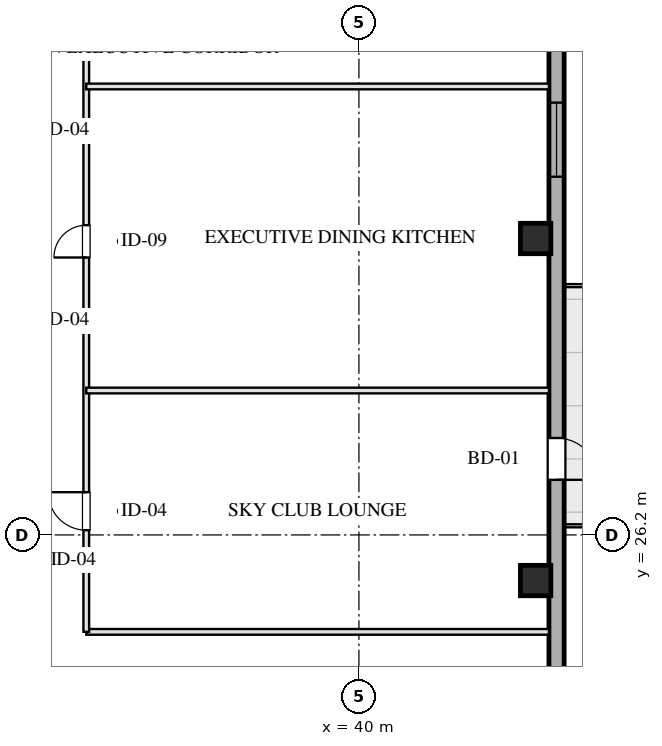
"""IFC4 building model, lengths in metres.
Left out: names, types, materials, properties, quantities, classifications, styles, units other than length and angle.
Written with IfcOpenShell. Run it as: python <this file> out.ifc"""

import sys

from ifc_helpers import new_model, si_unit, direction, frame, frame_2d, origin, origin_2d, place, context, subcontext, project, spatial, rectangle, hollow_rectangle, extrude, element, fill, save


model = new_model("IFC4")
c1 = context("Model", 3, precision=1e-05, world=origin(), true_north=direction((0.0, 1.0)))
c2 = subcontext(c1, "Body", "Model", "MODEL_VIEW")
j1 = project(units=[si_unit("LENGTHUNIT", "METRE"), si_unit("PLANEANGLEUNIT", "RADIAN")], contexts=[c1])
p1 = place(None, origin())
s1 = spatial("IfcSite", under=j1, at=p1, CompositionType="ELEMENT")
p2 = place(p1, origin())
s2 = spatial("IfcBuilding", under=s1, at=p2, CompositionType="ELEMENT")
p3 = place(p2, frame((0.0, 0.0, 250.4)))
s3 = spatial("IfcBuildingStorey", under=s2, at=p3, CompositionType="ELEMENT", Elevation=250.4)
for number, where, z_axis, x_axis in (
    (1, (44.65, 25.0, 0.0), (0.0, 0.0, 1.0), (1.0, 0.0, 0.0)),
    (2, (44.65, 34.0, 0.0), (0.0, 0.0, 1.0), (1.0, 0.0, 0.0)),
):
    element("IfcColumn", number, at=place(p3, frame(where, z_axis=z_axis, x_axis=x_axis)), inside=s3, PredefinedType="COLUMN", context=c2, shape_type="SweptSolid", body=[
        extrude(hollow_rectangle(XDim=0.8, YDim=0.8, WallThickness=0.028, at=origin_2d()), origin(), (0.0, 0.0, 1.0), 3.201),
    ])
p4 = place(p3, frame((45.2, 54.9, 0.0), z_axis=(0.0, 0.0, 1.0), x_axis=(0.0, -1.0, 0.0)))
e3 = element("IfcWall", 3, at=p4, inside=s3, PredefinedType="SOLIDWALL", context=c2, shape_type="SweptSolid", body=[
    extrude(rectangle(XDim=41.8, YDim=0.4, at=frame_2d((20.9, 0.0))), origin(), (0.0, 0.0, 1.0), 2.36),
])
p5 = place(p4, frame((17.325, 0.0, 0.75)))
e4 = element("IfcOpeningElement", 4, at=p5, cuts=e3, PredefinedType="OPENING", context=c2, shape_type="SweptSolid", body=[
    extrude(rectangle(XDim=1.95, YDim=1.21, at=frame_2d((0.975, 0.605))), frame((0.0, 0.21, 0.0), z_axis=(0.0, -1.0, 0.0), x_axis=(1.0, 0.0, 0.0)), (0.0, 0.0, 1.0), 0.42),
])
p6 = place(p4, frame((13.525, 0.0, 0.75)))
e5 = element("IfcOpeningElement", 5, at=p6, cuts=e3, PredefinedType="OPENING", context=c2, shape_type="SweptSolid", body=[
    extrude(rectangle(XDim=1.95, YDim=1.21, at=frame_2d((0.975, 0.605))), frame((0.0, 0.21, 0.0), z_axis=(0.0, -1.0, 0.0), x_axis=(1.0, 0.0, 0.0)), (0.0, 0.0, 1.0), 0.42),
])
p7 = place(p4, frame((26.15, 0.0, 0.0)))
e6 = element("IfcOpeningElement", 6, at=p7, cuts=e3, PredefinedType="OPENING", context=c2, shape_type="SweptSolid", body=[
    extrude(rectangle(XDim=1.1, YDim=2.15, at=frame_2d((0.55, 1.075))), frame((0.0, 0.21, 0.0), z_axis=(0.0, -1.0, 0.0), x_axis=(1.0, 0.0, 0.0)), (0.0, 0.0, 1.0), 0.42),
])
p8 = place(p3, frame((32.825, 23.65, 0.0), z_axis=(0.0, 0.0, 1.0), x_axis=(1.0, 0.0, 0.0)))
e7 = element("IfcWall", 7, at=p8, inside=s3, PredefinedType="PARTITIONING", context=c2, shape_type="SweptSolid", body=[
    extrude(rectangle(XDim=12.175, YDim=0.15, at=frame_2d((6.087, 0.0))), origin(), (0.0, 0.0, 1.0), 2.925),
])
p9 = place(p3, frame((32.825, 23.65, 0.0), z_axis=(0.0, 0.0, 1.0), x_axis=(0.0, 1.0, 0.0)))
e8 = element("IfcWall", 8, at=p9, inside=s3, PredefinedType="PARTITIONING", context=c2, shape_type="SweptSolid", body=[
    extrude(rectangle(XDim=20.7, YDim=0.15, at=frame_2d((10.35, 0.0))), origin(), (0.0, 0.0, 1.0), 2.925),
])
p10 = place(p9, frame((2.675, 0.0, 0.0)))
e9 = element("IfcOpeningElement", 9, at=p10, cuts=e8, PredefinedType="OPENING", context=c2, shape_type="SweptSolid", body=[
    extrude(rectangle(XDim=1.0, YDim=2.05, at=frame_2d((0.5, 1.025))), frame((0.0, 0.085, 0.0), z_axis=(0.0, -1.0, 0.0), x_axis=(1.0, 0.0, 0.0)), (0.0, 0.0, 1.0), 0.17),
])
p11 = place(p9, frame((9.85, 0.0, 0.0)))
e10 = element("IfcOpeningElement", 10, at=p11, cuts=e8, PredefinedType="OPENING", context=c2, shape_type="SweptSolid", body=[
    extrude(rectangle(XDim=0.85, YDim=2.05, at=frame_2d((0.425, 1.025))), frame((0.0, 0.085, 0.0), z_axis=(0.0, -1.0, 0.0), x_axis=(1.0, 0.0, 0.0)), (0.0, 0.0, 1.0), 0.17),
])
p12 = place(p9, frame((17.025, 0.0, 0.0)))
e11 = element("IfcOpeningElement", 11, at=p12, cuts=e8, PredefinedType="OPENING", context=c2, shape_type="SweptSolid", body=[
    extrude(rectangle(XDim=1.05, YDim=2.05, at=frame_2d((0.525, 1.025))), frame((0.0, 0.085, 0.0), z_axis=(0.0, -1.0, 0.0), x_axis=(1.0, 0.0, 0.0)), (0.0, 0.0, 1.0), 0.17),
])
for number, where, z_axis, x_axis in (
    (12, (32.825, 30.0, 0.0), (0.0, 0.0, 1.0), (1.0, 0.0, 0.0)),
    (13, (32.825, 38.0, 0.0), (0.0, 0.0, 1.0), (1.0, 0.0, 0.0)),
):
    element("IfcWall", number, at=place(p3, frame(where, z_axis=z_axis, x_axis=x_axis)), inside=s3, PredefinedType="PARTITIONING", context=c2, shape_type="SweptSolid", body=[
        extrude(rectangle(XDim=12.175, YDim=0.15, at=frame_2d((6.087, 0.0))), origin(), (0.0, 0.0, 1.0), 2.925),
    ])
p13 = place(p5, origin())
e14 = element("IfcWindow", 14, at=p13, inside=s3, PartitioningType="TRIPLE_PANEL_VERTICAL", PredefinedType="WINDOW", context=c2, shape_type="SweptSolid", body=[
    extrude(rectangle(XDim=1.95, YDim=1.21, at=frame_2d((0.975, 0.605))), frame((0.0, 0.03, 0.0), z_axis=(0.0, -1.0, 0.0), x_axis=(1.0, 0.0, 0.0)), (0.0, 0.0, 1.0), 0.06),
])
fill(e4, e14)
p14 = place(p7, origin())
e15 = element("IfcDoor", 15, at=p14, inside=s3, OperationType="SINGLE_SWING_RIGHT", PredefinedType="DOOR", context=c2, shape_type="SweptSolid", body=[
    extrude(rectangle(XDim=1.1, YDim=2.15, at=frame_2d((0.55, 1.075))), frame((0.0, 0.025, 0.0), z_axis=(0.0, -1.0, 0.0), x_axis=(1.0, 0.0, 0.0)), (0.0, 0.0, 1.0), 0.05),
])
fill(e6, e15)
p15 = place(p10, origin())
e16 = element("IfcDoor", 16, at=p15, inside=s3, OperationType="SINGLE_SWING_RIGHT", PredefinedType="DOOR", context=c2, shape_type="SweptSolid", body=[
    extrude(rectangle(XDim=1.0, YDim=2.05, at=frame_2d((0.5, 1.025))), frame((0.0, 0.025, 0.0), z_axis=(0.0, -1.0, 0.0), x_axis=(1.0, 0.0, 0.0)), (0.0, 0.0, 1.0), 0.05),
])
fill(e9, e16)
p16 = place(p11, origin())
e17 = element("IfcDoor", 17, at=p16, inside=s3, OperationType="SINGLE_SWING_LEFT", PredefinedType="DOOR", context=c2, shape_type="SweptSolid", body=[
    extrude(rectangle(XDim=0.85, YDim=2.05, at=frame_2d((0.425, 1.025))), frame((0.0, 0.025, 0.0), z_axis=(0.0, -1.0, 0.0), x_axis=(1.0, 0.0, 0.0)), (0.0, 0.0, 1.0), 0.05),
])
fill(e10, e17)
save(model, sys.argv[1])
